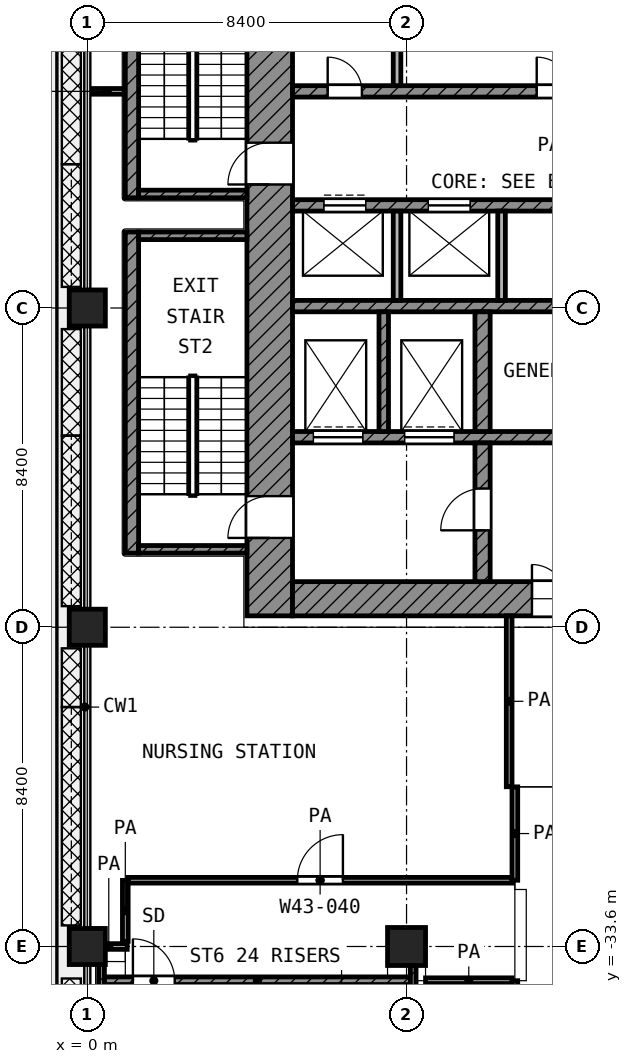
"""IFC4 building model, lengths in metres.
Left out: names, types, materials, properties, quantities, classifications, styles, units other than length and angle.
Written with IfcOpenShell. Run it as: python <this file> out.ifc"""

import sys

from ifc_helpers import new_model, si_unit, direction, frame, frame_2d, origin, origin_2d, place, context, subcontext, project, spatial, rectangle, extrude, element, fill, save


model = new_model("IFC4")
c1 = context("Model", 3, precision=1e-05, world=origin(), true_north=direction((0.0, 1.0)))
c2 = subcontext(c1, "Body", "Model", "MODEL_VIEW")
j1 = project(units=[si_unit("LENGTHUNIT", "METRE"), si_unit("PLANEANGLEUNIT", "RADIAN")], contexts=[c1])
p1 = place(None, origin())
s1 = spatial("IfcSite", under=j1, at=p1, CompositionType="ELEMENT")
p2 = place(p1, origin())
s2 = spatial("IfcBuilding", under=s1, at=p2, CompositionType="ELEMENT")
p3 = place(p2, frame((0.0, 0.0, 208.8)))
s3 = spatial("IfcBuildingStorey", under=s2, at=p3, CompositionType="ELEMENT", Elevation=208.8)
for number, where, z_axis, x_axis in (
    (1, (0.0, -16.8, 0.0), (0.0, 0.0, 1.0), (1.0, 0.0, 0.0)),
    (2, (0.0, -25.2, 0.0), (0.0, 0.0, 1.0), (1.0, 0.0, 0.0)),
    (3, (0.0, -33.6, 0.0), (0.0, 0.0, 1.0), (1.0, 0.0, 0.0)),
):
    element("IfcColumn", number, at=place(p3, frame(where, z_axis=z_axis, x_axis=x_axis)), inside=s3, PredefinedType="COLUMN", context=c2, shape_type="SweptSolid", body=[
        extrude(rectangle(XDim=0.95, YDim=0.95, at=origin_2d()), origin(), (0.0, 0.0, 1.0), 4.2),
    ])
p4 = place(p3, frame((8.4, -33.6, 0.0), z_axis=(0.0, 0.0, 1.0), x_axis=(1.0, 0.0, 0.0)))
e4 = element("IfcColumn", 4, at=p4, inside=s3, PredefinedType="COLUMN", context=c2, shape_type="SweptSolid", body=[
    extrude(rectangle(XDim=1.0, YDim=1.0, at=origin_2d()), origin(), (0.0, 0.0, 1.0), 4.2),
])
p5 = place(p3, frame((4.8, -24.9, 0.0), z_axis=(0.0, 0.0, 1.0), x_axis=(0.0, 1.0, 0.0)))
e5 = element("IfcWall", 5, at=p5, inside=s3, PredefinedType="SHEAR", context=c2, shape_type="SweptSolid", body=[
    extrude(rectangle(XDim=19.5, YDim=1.2, at=frame_2d((9.75, 0.0))), origin(), (0.0, 0.0, 1.0), 3.7),
])
p6 = place(p5, frame((11.35, 0.0, 0.0)))
e6 = element("IfcOpeningElement", 6, at=p6, cuts=e5, PredefinedType="OPENING", context=c2, shape_type="SweptSolid", body=[
    extrude(rectangle(XDim=1.1, YDim=2.1, at=frame_2d((0.55, 1.05))), frame((0.0, 0.61, 0.0), z_axis=(0.0, -1.0, 0.0), x_axis=(1.0, 0.0, 0.0)), (0.0, 0.0, 1.0), 1.22),
])
p7 = place(p5, frame((2.05, 0.0, 0.0)))
e7 = element("IfcOpeningElement", 7, at=p7, cuts=e5, PredefinedType="OPENING", context=c2, shape_type="SweptSolid", body=[
    extrude(rectangle(XDim=1.1, YDim=2.1, at=frame_2d((0.55, 1.05))), frame((0.0, 0.61, 0.0), z_axis=(0.0, -1.0, 0.0), x_axis=(1.0, 0.0, 0.0)), (0.0, 0.0, 1.0), 1.22),
])
p8 = place(p3, frame((5.4, -24.45, 0.0), z_axis=(0.0, 0.0, 1.0), x_axis=(1.0, 0.0, 0.0)))
e8 = element("IfcWall", 8, at=p8, inside=s3, PredefinedType="SHEAR", context=c2, shape_type="SweptSolid", body=[
    extrude(rectangle(XDim=18.6, YDim=0.9, at=frame_2d((9.3, 0.0))), origin(), (0.0, 0.0, 1.0), 3.7),
])
p9 = place(p8, frame((6.3, 0.0, 0.0)))
e9 = element("IfcOpeningElement", 9, at=p9, cuts=e8, PredefinedType="OPENING", context=c2, shape_type="SweptSolid", body=[
    extrude(rectangle(XDim=1.8, YDim=2.1, at=frame_2d((0.9, 1.05))), frame((0.0, 0.46, 0.0), z_axis=(0.0, -1.0, 0.0), x_axis=(1.0, 0.0, 0.0)), (0.0, 0.0, 1.0), 0.92),
])
p10 = place(p3, frame((5.4, -11.1, 0.0), z_axis=(0.0, 0.0, 1.0), x_axis=(1.0, 0.0, 0.0)))
e10 = element("IfcWall", 10, at=p10, inside=s3, PredefinedType="SHEAR", context=c2, shape_type="SweptSolid", body=[
    extrude(rectangle(XDim=16.65, YDim=0.3, at=frame_2d((8.325, 0.0))), origin(), (0.0, 0.0, 1.0), 3.7),
])
p11 = place(p10, frame((11.825, 0.0, 0.0)))
e11 = element("IfcOpeningElement", 11, at=p11, cuts=e10, PredefinedType="OPENING", context=c2, shape_type="SweptSolid", body=[
    extrude(rectangle(XDim=1.1, YDim=2.1, at=frame_2d((0.55, 1.05))), frame((0.0, 0.16, 0.0), z_axis=(0.0, -1.0, 0.0), x_axis=(1.0, 0.0, 0.0)), (0.0, 0.0, 1.0), 0.32),
])
p12 = place(p10, frame((14.575, 0.0, 0.0)))
e12 = element("IfcOpeningElement", 12, at=p12, cuts=e10, PredefinedType="OPENING", context=c2, shape_type="SweptSolid", body=[
    extrude(rectangle(XDim=1.1, YDim=2.1, at=frame_2d((0.55, 1.05))), frame((0.0, 0.16, 0.0), z_axis=(0.0, -1.0, 0.0), x_axis=(1.0, 0.0, 0.0)), (0.0, 0.0, 1.0), 0.32),
])
p13 = place(p10, frame((0.925, 0.0, 0.0)))
e13 = element("IfcOpeningElement", 13, at=p13, cuts=e10, PredefinedType="OPENING", context=c2, shape_type="SweptSolid", body=[
    extrude(rectangle(XDim=0.9, YDim=2.1, at=frame_2d((0.45, 1.05))), frame((0.0, 0.16, 0.0), z_axis=(0.0, -1.0, 0.0), x_axis=(1.0, 0.0, 0.0)), (0.0, 0.0, 1.0), 0.32),
])
p14 = place(p10, frame((6.425, 0.0, 0.0)))
e14 = element("IfcOpeningElement", 14, at=p14, cuts=e10, PredefinedType="OPENING", context=c2, shape_type="SweptSolid", body=[
    extrude(rectangle(XDim=0.9, YDim=2.1, at=frame_2d((0.45, 1.05))), frame((0.0, 0.16, 0.0), z_axis=(0.0, -1.0, 0.0), x_axis=(1.0, 0.0, 0.0)), (0.0, 0.0, 1.0), 0.32),
])
p15 = place(p3, frame((5.4, -14.1, 0.0), z_axis=(0.0, 0.0, 1.0), x_axis=(1.0, 0.0, 0.0)))
e15 = element("IfcWall", 15, at=p15, inside=s3, PredefinedType="SHEAR", context=c2, shape_type="SweptSolid", body=[
    extrude(rectangle(XDim=16.65, YDim=0.3, at=frame_2d((8.325, 0.0))), origin(), (0.0, 0.0, 1.0), 3.7),
])
p16 = place(p15, frame((0.825, 0.0, 0.0)))
e16 = element("IfcOpeningElement", 16, at=p16, cuts=e15, PredefinedType="OPENING", context=c2, shape_type="SweptSolid", body=[
    extrude(rectangle(XDim=1.1, YDim=2.1, at=frame_2d((0.55, 1.05))), frame((0.0, 0.16, 0.0), z_axis=(0.0, -1.0, 0.0), x_axis=(1.0, 0.0, 0.0)), (0.0, 0.0, 1.0), 0.32),
])
p17 = place(p15, frame((3.575, 0.0, 0.0)))
e17 = element("IfcOpeningElement", 17, at=p17, cuts=e15, PredefinedType="OPENING", context=c2, shape_type="SweptSolid", body=[
    extrude(rectangle(XDim=1.1, YDim=2.1, at=frame_2d((0.55, 1.05))), frame((0.0, 0.16, 0.0), z_axis=(0.0, -1.0, 0.0), x_axis=(1.0, 0.0, 0.0)), (0.0, 0.0, 1.0), 0.32),
])
p18 = place(p3, frame((5.4, -16.75, 0.0), z_axis=(0.0, 0.0, 1.0), x_axis=(1.0, 0.0, 0.0)))
e18 = element("IfcWall", 18, at=p18, inside=s3, PredefinedType="SHEAR", context=c2, shape_type="SweptSolid", body=[
    extrude(rectangle(XDim=16.65, YDim=0.3, at=frame_2d((8.325, 0.0))), origin(), (0.0, 0.0, 1.0), 3.7),
])
p19 = place(p3, frame((5.4, -20.2, 0.0), z_axis=(0.0, 0.0, 1.0), x_axis=(1.0, 0.0, 0.0)))
e19 = element("IfcWall", 19, at=p19, inside=s3, PredefinedType="SHEAR", context=c2, shape_type="SweptSolid", body=[
    extrude(rectangle(XDim=14.65, YDim=0.3, at=frame_2d((7.325, 0.0))), origin(), (0.0, 0.0, 1.0), 3.7),
])
p20 = place(p19, frame((10.55, 0.0, 0.0)))
e20 = element("IfcOpeningElement", 20, at=p20, cuts=e19, PredefinedType="OPENING", context=c2, shape_type="SweptSolid", body=[
    extrude(rectangle(XDim=1.3, YDim=2.1, at=frame_2d((0.65, 1.05))), frame((0.0, 0.16, 0.0), z_axis=(0.0, -1.0, 0.0), x_axis=(1.0, 0.0, 0.0)), (0.0, 0.0, 1.0), 0.32),
])
p21 = place(p19, frame((12.95, 0.0, 0.0)))
e21 = element("IfcOpeningElement", 21, at=p21, cuts=e19, PredefinedType="OPENING", context=c2, shape_type="SweptSolid", body=[
    extrude(rectangle(XDim=1.3, YDim=2.1, at=frame_2d((0.65, 1.05))), frame((0.0, 0.16, 0.0), z_axis=(0.0, -1.0, 0.0), x_axis=(1.0, 0.0, 0.0)), (0.0, 0.0, 1.0), 0.32),
])
p22 = place(p19, frame((0.55, 0.0, 0.0)))
e22 = element("IfcOpeningElement", 22, at=p22, cuts=e19, PredefinedType="OPENING", context=c2, shape_type="SweptSolid", body=[
    extrude(rectangle(XDim=1.3, YDim=2.1, at=frame_2d((0.65, 1.05))), frame((0.0, 0.16, 0.0), z_axis=(0.0, -1.0, 0.0), x_axis=(1.0, 0.0, 0.0)), (0.0, 0.0, 1.0), 0.32),
])
p23 = place(p19, frame((2.95, 0.0, 0.0)))
e23 = element("IfcOpeningElement", 23, at=p23, cuts=e19, PredefinedType="OPENING", context=c2, shape_type="SweptSolid", body=[
    extrude(rectangle(XDim=1.3, YDim=2.1, at=frame_2d((0.65, 1.05))), frame((0.0, 0.16, 0.0), z_axis=(0.0, -1.0, 0.0), x_axis=(1.0, 0.0, 0.0)), (0.0, 0.0, 1.0), 0.32),
])
p24 = place(p19, frame((7.15, 0.0, 0.0)))
e24 = element("IfcOpeningElement", 24, at=p24, cuts=e19, PredefinedType="OPENING", context=c2, shape_type="SweptSolid", body=[
    extrude(rectangle(XDim=0.9, YDim=2.1, at=frame_2d((0.45, 1.05))), frame((0.0, 0.16, 0.0), z_axis=(0.0, -1.0, 0.0), x_axis=(1.0, 0.0, 0.0)), (0.0, 0.0, 1.0), 0.32),
])
p25 = place(p3, frame((10.4, -24.0, 0.0), z_axis=(0.0, 0.0, 1.0), x_axis=(0.0, 1.0, 0.0)))
e25 = element("IfcWall", 25, at=p25, inside=s3, PredefinedType="SHEAR", context=c2, shape_type="SweptSolid", body=[
    extrude(rectangle(XDim=3.65, YDim=0.4, at=frame_2d((1.825, 0.0))), origin(), (0.0, 0.0, 1.0), 3.7),
])
p26 = place(p25, frame((1.35, 0.0, 0.0)))
e26 = element("IfcOpeningElement", 26, at=p26, cuts=e25, PredefinedType="OPENING", context=c2, shape_type="SweptSolid", body=[
    extrude(rectangle(XDim=1.1, YDim=2.1, at=frame_2d((0.55, 1.05))), frame((0.0, 0.21, 0.0), z_axis=(0.0, -1.0, 0.0), x_axis=(1.0, 0.0, 0.0)), (0.0, 0.0, 1.0), 0.42),
])
p27 = place(p3, frame((10.4, -20.05, 0.0), z_axis=(0.0, 0.0, 1.0), x_axis=(0.0, 1.0, 0.0)))
e27 = element("IfcWall", 27, at=p27, inside=s3, PredefinedType="SHEAR", context=c2, shape_type="SweptSolid", body=[
    extrude(rectangle(XDim=3.15, YDim=0.4, at=frame_2d((1.575, 0.0))), origin(), (0.0, 0.0, 1.0), 3.7),
])
p28 = place(p3, frame((7.8, -20.05, 0.0), z_axis=(0.0, 0.0, 1.0), x_axis=(0.0, 1.0, 0.0)))
e28 = element("IfcWall", 28, at=p28, inside=s3, PredefinedType="SHEAR", context=c2, shape_type="SweptSolid", body=[
    extrude(rectangle(XDim=3.15, YDim=0.25, at=frame_2d((1.575, 0.0))), origin(), (0.0, 0.0, 1.0), 3.7),
])
p29 = place(p3, frame((8.15, -10.95, 0.0), z_axis=(0.0, 0.0, 1.0), x_axis=(0.0, 1.0, 0.0)))
e29 = element("IfcWall", 29, at=p29, inside=s3, PredefinedType="PARTITIONING", context=c2, shape_type="SweptSolid", body=[
    extrude(rectangle(XDim=2.35, YDim=0.2, at=frame_2d((1.175, 0.0))), origin(), (0.0, 0.0, 1.0), 3.7),
])
for number, where, z_axis, x_axis in (
    (30, (8.15, -16.6, 0.0), (0.0, 0.0, 1.0), (0.0, 1.0, 0.0)),
    (31, (10.9, -16.6, 0.0), (0.0, 0.0, 1.0), (0.0, 1.0, 0.0)),
):
    element("IfcWall", number, at=place(p3, frame(where, z_axis=z_axis, x_axis=x_axis)), inside=s3, PredefinedType="PARTITIONING", context=c2, shape_type="SweptSolid", body=[
        extrude(rectangle(XDim=2.35, YDim=0.2, at=frame_2d((1.175, 0.0))), origin(), (0.0, 0.0, 1.0), 3.7),
    ])
p30 = place(p3, frame((1.175, -13.9, 0.0), z_axis=(0.0, 0.0, 1.0), x_axis=(0.0, 1.0, 0.0)))
e32 = element("IfcWall", 32, at=p30, inside=s3, PredefinedType="SHEAR", context=c2, shape_type="SweptSolid", body=[
    extrude(rectangle(XDim=8.45, YDim=0.35, at=frame_2d((4.225, 0.0))), origin(), (0.0, 0.0, 1.0), 3.7),
])
p31 = place(p3, frame((1.35, -13.8, 0.0), z_axis=(0.0, 0.0, 1.0), x_axis=(1.0, 0.0, 0.0)))
e33 = element("IfcWall", 33, at=p31, inside=s3, PredefinedType="SHEAR", context=c2, shape_type="SweptSolid", body=[
    extrude(rectangle(XDim=2.85, YDim=0.2, at=frame_2d((1.425, 0.0))), origin(), (0.0, 0.0, 1.0), 3.7),
])
p32 = place(p3, frame((1.175, -23.25, 0.0), z_axis=(0.0, 0.0, 1.0), x_axis=(0.0, 1.0, 0.0)))
e34 = element("IfcWall", 34, at=p32, inside=s3, PredefinedType="SHEAR", context=c2, shape_type="SweptSolid", body=[
    extrude(rectangle(XDim=8.45, YDim=0.35, at=frame_2d((4.225, 0.0))), origin(), (0.0, 0.0, 1.0), 3.7),
])
for number, where, z_axis, x_axis in (
    (35, (1.35, -14.9, 0.0), (0.0, 0.0, 1.0), (1.0, 0.0, 0.0)),
    (36, (1.35, -23.15, 0.0), (0.0, 0.0, 1.0), (1.0, 0.0, 0.0)),
):
    element("IfcWall", number, at=place(p3, frame(where, z_axis=z_axis, x_axis=x_axis)), inside=s3, PredefinedType="SHEAR", context=c2, shape_type="SweptSolid", body=[
        extrude(rectangle(XDim=2.85, YDim=0.2, at=frame_2d((1.425, 0.0))), origin(), (0.0, 0.0, 1.0), 3.7),
    ])
p33 = place(p3, frame((0.375, -40.05, 0.0), z_axis=(0.0, 0.0, 1.0), x_axis=(0.0, 1.0, 0.0)))
e37 = element("IfcWall", 37, at=p33, inside=s3, PredefinedType="SHEAR", context=c2, shape_type="SweptSolid", body=[
    extrude(rectangle(XDim=5.975, YDim=0.15, at=frame_2d((2.988, 0.0))), origin(), (0.0, 0.0, 1.0), 3.7),
])
p34 = place(p3, frame((8.575, -40.05, 0.0), z_axis=(0.0, 0.0, 1.0), x_axis=(0.0, 1.0, 0.0)))
e38 = element("IfcWall", 38, at=p34, inside=s3, PredefinedType="SHEAR", context=c2, shape_type="SweptSolid", body=[
    extrude(rectangle(XDim=5.95, YDim=0.15, at=frame_2d((2.975, 0.0))), origin(), (0.0, 0.0, 1.0), 3.7),
])
p35 = place(p3, frame((0.45, -34.5, 0.0), z_axis=(0.0, 0.0, 1.0), x_axis=(1.0, 0.0, 0.0)))
e39 = element("IfcWall", 39, at=p35, inside=s3, PredefinedType="SHEAR", context=c2, shape_type="SweptSolid", body=[
    extrude(rectangle(XDim=8.05, YDim=0.2, at=frame_2d((4.025, 0.0))), origin(), (0.0, 0.0, 1.0), 3.7),
])
p36 = place(p35, frame((0.75, 0.0, 0.0)))
e40 = element("IfcOpeningElement", 40, at=p36, cuts=e39, PredefinedType="OPENING", context=c2, shape_type="SweptSolid", body=[
    extrude(rectangle(XDim=1.1, YDim=2.1, at=frame_2d((0.55, 1.05))), frame((0.0, 0.11, 0.0), z_axis=(0.0, -1.0, 0.0), x_axis=(1.0, 0.0, 0.0)), (0.0, 0.0, 1.0), 0.22),
])
p37 = place(p3, frame((8.9, -34.5, 0.0), z_axis=(0.0, 0.0, 1.0), x_axis=(1.0, 0.0, 0.0)))
e41 = element("IfcWall", 41, at=p37, inside=s3, PredefinedType="PARTITIONING", context=c2, shape_type="SweptSolid", body=[
    extrude(rectangle(XDim=2.275, YDim=0.15, at=frame_2d((1.138, 0.0))), origin(), (0.0, 0.0, 1.0), 3.7),
])
p38 = place(p3, frame((0.08, -33.6, 0.0), z_axis=(0.0, 0.0, 1.0), x_axis=(1.0, 0.0, 0.0)))
e42 = element("IfcWall", 42, at=p38, inside=s3, PredefinedType="PARTITIONING", context=c2, shape_type="SweptSolid", body=[
    extrude(rectangle(XDim=0.97, YDim=0.15, at=frame_2d((0.485, 0.0))), origin(), (0.0, 0.0, 1.0), 3.7),
])
p39 = place(p3, frame((1.077, -31.857, 0.0), z_axis=(0.0, 0.0, 1.0), x_axis=(1.0, 0.0, 0.0)))
e43 = element("IfcWall", 43, at=p39, inside=s3, PredefinedType="PARTITIONING", context=c2, shape_type="SweptSolid", body=[
    extrude(rectangle(XDim=10.098, YDim=0.15, at=frame_2d((5.049, 0.0))), origin(), (0.0, 0.0, 1.0), 3.7),
])
p40 = place(p39, frame((4.449, 0.0, 0.0)))
e44 = element("IfcOpeningElement", 44, at=p40, cuts=e43, PredefinedType="OPENING", context=c2, shape_type="SweptSolid", body=[
    extrude(rectangle(XDim=1.2, YDim=2.1, at=frame_2d((0.6, 1.05))), frame((0.0, 0.085, 0.0), z_axis=(0.0, -1.0, 0.0), x_axis=(1.0, 0.0, 0.0)), (0.0, 0.0, 1.0), 0.17),
])
p41 = place(p3, frame((0.08, -11.1, 0.0), z_axis=(0.0, 0.0, 1.0), x_axis=(1.0, 0.0, 0.0)))
e45 = element("IfcWall", 45, at=p41, inside=s3, PredefinedType="PARTITIONING", context=c2, shape_type="SweptSolid", body=[
    extrude(rectangle(XDim=0.89, YDim=0.15, at=frame_2d((0.445, 0.0))), origin(), (0.0, 0.0, 1.0), 3.7),
])
p42 = place(p3, frame((1.0, -33.465, 0.0), z_axis=(0.0, 0.0, 1.0), x_axis=(0.0, 1.0, 0.0)))
e46 = element("IfcWall", 46, at=p42, inside=s3, PredefinedType="PARTITIONING", context=c2, shape_type="SweptSolid", body=[
    extrude(rectangle(XDim=1.605, YDim=0.15, at=frame_2d((0.802, 0.0))), origin(), (0.0, 0.0, 1.0), 3.7),
])
p43 = place(p3, frame((11.1, -29.397, 0.0), z_axis=(0.0, 0.0, 1.0), x_axis=(0.0, 1.0, 0.0)))
e47 = element("IfcWall", 47, at=p43, inside=s3, PredefinedType="PARTITIONING", context=c2, shape_type="SweptSolid", body=[
    extrude(rectangle(XDim=4.497, YDim=0.15, at=frame_2d((2.249, 0.0))), origin(), (0.0, 0.0, 1.0), 3.7),
])
p44 = place(p3, frame((11.25, -39.95, 0.0), z_axis=(0.0, 0.0, 1.0), x_axis=(0.0, 1.0, 0.0)))
e48 = element("IfcWall", 48, at=p44, inside=s3, PredefinedType="PARTITIONING", context=c2, shape_type="SweptSolid", body=[
    extrude(rectangle(XDim=5.45, YDim=0.15, at=frame_2d((2.725, 0.0))), origin(), (0.0, 0.0, 1.0), 3.7),
])
p45 = place(p44, frame((2.225, 0.0, 0.0)))
e49 = element("IfcOpeningElement", 49, at=p45, cuts=e48, PredefinedType="OPENING", context=c2, shape_type="SweptSolid", body=[
    extrude(rectangle(XDim=1.0, YDim=2.1, at=frame_2d((0.5, 1.05))), frame((0.0, 0.085, 0.0), z_axis=(0.0, -1.0, 0.0), x_axis=(1.0, 0.0, 0.0)), (0.0, 0.0, 1.0), 0.17),
])
p46 = place(p3, frame((11.25, -31.857, 0.0), z_axis=(0.0, 0.0, 1.0), x_axis=(0.0, 1.0, 0.0)))
e50 = element("IfcWall", 50, at=p46, inside=s3, PredefinedType="PARTITIONING", context=c2, shape_type="SweptSolid", body=[
    extrude(rectangle(XDim=2.457, YDim=0.15, at=frame_2d((1.229, 0.0))), origin(), (0.0, 0.0, 1.0), 3.7),
])
p47 = place(p16, origin())
e51 = element("IfcDoor", 51, at=p47, inside=s3, OperationType="DOUBLE_DOOR_SLIDING", PredefinedType="DOOR", context=c2, shape_type="SweptSolid", body=[
    extrude(rectangle(XDim=1.1, YDim=2.1, at=frame_2d((0.55, 1.05))), frame((0.0, 0.025, 0.0), z_axis=(0.0, -1.0, 0.0), x_axis=(1.0, 0.0, 0.0)), (0.0, 0.0, 1.0), 0.05),
])
fill(e16, e51)
p48 = place(p17, origin())
e52 = element("IfcDoor", 52, at=p48, inside=s3, OperationType="DOUBLE_DOOR_SLIDING", PredefinedType="DOOR", context=c2, shape_type="SweptSolid", body=[
    extrude(rectangle(XDim=1.1, YDim=2.1, at=frame_2d((0.55, 1.05))), frame((0.0, 0.025, 0.0), z_axis=(0.0, -1.0, 0.0), x_axis=(1.0, 0.0, 0.0)), (0.0, 0.0, 1.0), 0.05),
])
fill(e17, e52)
p49 = place(p22, origin())
e53 = element("IfcDoor", 53, at=p49, inside=s3, OperationType="DOUBLE_DOOR_SLIDING", PredefinedType="DOOR", context=c2, shape_type="SweptSolid", body=[
    extrude(rectangle(XDim=1.3, YDim=2.1, at=frame_2d((0.65, 1.05))), frame((0.0, 0.025, 0.0), z_axis=(0.0, -1.0, 0.0), x_axis=(1.0, 0.0, 0.0)), (0.0, 0.0, 1.0), 0.05),
])
fill(e22, e53)
p50 = place(p23, origin())
e54 = element("IfcDoor", 54, at=p50, inside=s3, OperationType="DOUBLE_DOOR_SLIDING", PredefinedType="DOOR", context=c2, shape_type="SweptSolid", body=[
    extrude(rectangle(XDim=1.3, YDim=2.1, at=frame_2d((0.65, 1.05))), frame((0.0, 0.025, 0.0), z_axis=(0.0, -1.0, 0.0), x_axis=(1.0, 0.0, 0.0)), (0.0, 0.0, 1.0), 0.05),
])
fill(e23, e54)
p51 = place(p6, origin())
e55 = element("IfcDoor", 55, at=p51, inside=s3, OperationType="SINGLE_SWING_LEFT", PredefinedType="DOOR", context=c2, shape_type="SweptSolid", body=[
    extrude(rectangle(XDim=1.1, YDim=2.1, at=frame_2d((0.55, 1.05))), frame((0.0, 0.025, 0.0), z_axis=(0.0, -1.0, 0.0), x_axis=(1.0, 0.0, 0.0)), (0.0, 0.0, 1.0), 0.05),
])
fill(e6, e55)
p52 = place(p7, origin())
e56 = element("IfcDoor", 56, at=p52, inside=s3, OperationType="SINGLE_SWING_LEFT", PredefinedType="DOOR", context=c2, shape_type="SweptSolid", body=[
    extrude(rectangle(XDim=1.1, YDim=2.1, at=frame_2d((0.55, 1.05))), frame((0.0, 0.025, 0.0), z_axis=(0.0, -1.0, 0.0), x_axis=(1.0, 0.0, 0.0)), (0.0, 0.0, 1.0), 0.05),
])
fill(e7, e56)
p53 = place(p26, origin())
e57 = element("IfcDoor", 57, at=p53, inside=s3, OperationType="SINGLE_SWING_LEFT", PredefinedType="DOOR", context=c2, shape_type="SweptSolid", body=[
    extrude(rectangle(XDim=1.1, YDim=2.1, at=frame_2d((0.55, 1.05))), frame((0.0, 0.025, 0.0), z_axis=(0.0, -1.0, 0.0), x_axis=(1.0, 0.0, 0.0)), (0.0, 0.0, 1.0), 0.05),
])
fill(e26, e57)
p54 = place(p9, origin())
e58 = element("IfcDoor", 58, at=p54, inside=s3, OperationType="DOUBLE_DOOR_SINGLE_SWING", PredefinedType="DOOR", context=c2, shape_type="SweptSolid", body=[
    extrude(rectangle(XDim=1.8, YDim=2.1, at=frame_2d((0.9, 1.05))), frame((0.0, 0.025, 0.0), z_axis=(0.0, -1.0, 0.0), x_axis=(1.0, 0.0, 0.0)), (0.0, 0.0, 1.0), 0.05),
])
fill(e9, e58)
p55 = place(p13, origin())
e59 = element("IfcDoor", 59, at=p55, inside=s3, OperationType="SINGLE_SWING_LEFT", PredefinedType="DOOR", context=c2, shape_type="SweptSolid", body=[
    extrude(rectangle(XDim=0.9, YDim=2.1, at=frame_2d((0.45, 1.05))), frame((0.0, 0.025, 0.0), z_axis=(0.0, -1.0, 0.0), x_axis=(1.0, 0.0, 0.0)), (0.0, 0.0, 1.0), 0.05),
])
fill(e13, e59)
p56 = place(p14, origin())
e60 = element("IfcDoor", 60, at=p56, inside=s3, OperationType="SINGLE_SWING_LEFT", PredefinedType="DOOR", context=c2, shape_type="SweptSolid", body=[
    extrude(rectangle(XDim=0.9, YDim=2.1, at=frame_2d((0.45, 1.05))), frame((0.0, 0.025, 0.0), z_axis=(0.0, -1.0, 0.0), x_axis=(1.0, 0.0, 0.0)), (0.0, 0.0, 1.0), 0.05),
])
fill(e14, e60)
p57 = place(p36, origin())
e61 = element("IfcDoor", 61, at=p57, inside=s3, OperationType="SINGLE_SWING_LEFT", PredefinedType="DOOR", context=c2, shape_type="SweptSolid", body=[
    extrude(rectangle(XDim=1.1, YDim=2.1, at=frame_2d((0.55, 1.05))), frame((0.0, 0.025, 0.0), z_axis=(0.0, -1.0, 0.0), x_axis=(1.0, 0.0, 0.0)), (0.0, 0.0, 1.0), 0.05),
])
fill(e40, e61)
p58 = place(p40, origin())
e62 = element("IfcDoor", 62, at=p58, inside=s3, OperationType="SINGLE_SWING_RIGHT", PredefinedType="DOOR", context=c2, shape_type="SweptSolid", body=[
    extrude(rectangle(XDim=1.2, YDim=2.1, at=frame_2d((0.6, 1.05))), frame((0.0, 0.025, 0.0), z_axis=(0.0, -1.0, 0.0), x_axis=(1.0, 0.0, 0.0)), (0.0, 0.0, 1.0), 0.05),
])
fill(e44, e62)
save(model, sys.argv[1])
